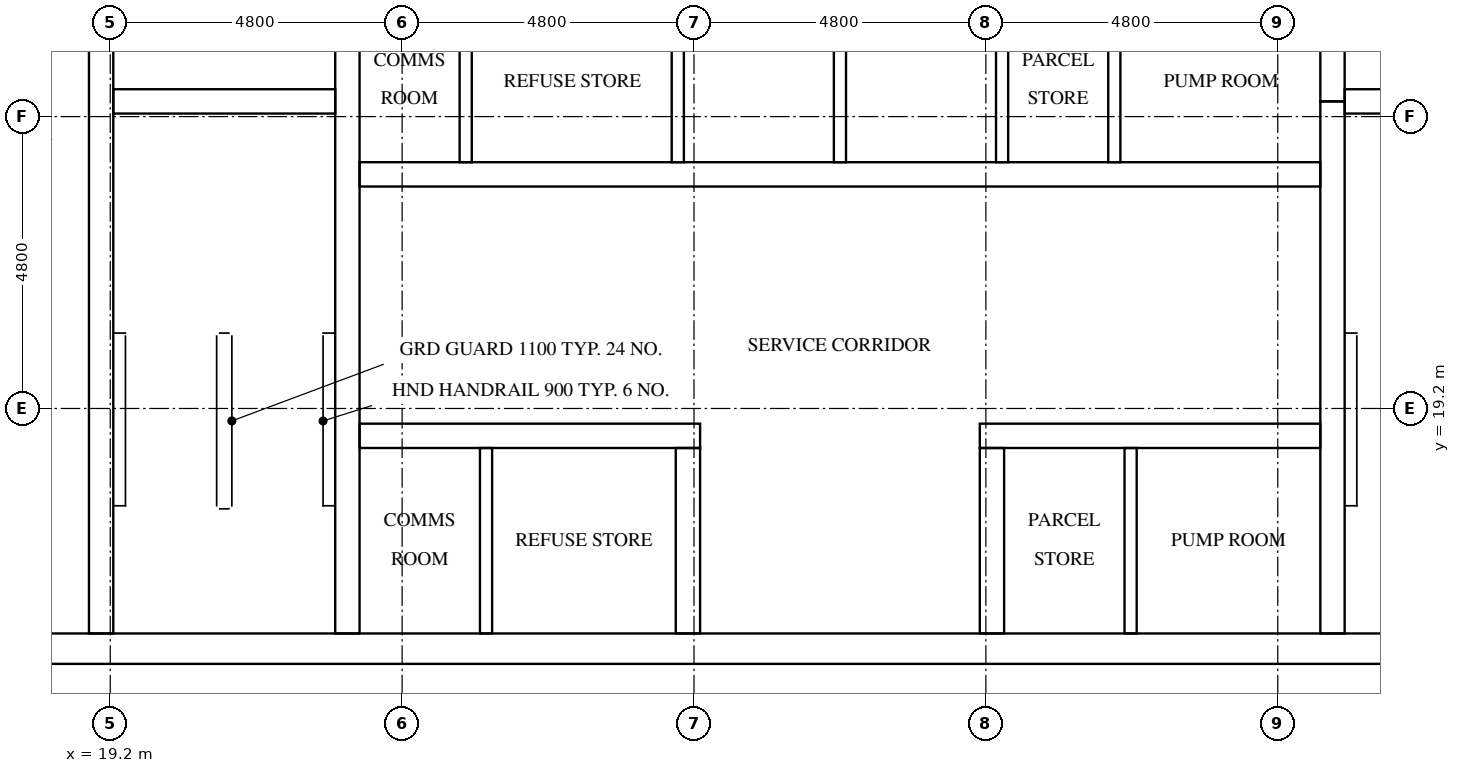
"""IFC4 building model, lengths in metres.
Left out: names, types, materials, properties, quantities, classifications, styles, units other than length and angle.
Written with IfcOpenShell. Run it as: python <this file> out.ifc"""

import sys

from ifc_helpers import new_model, si_unit, direction, frame, frame_2d, origin, place, context, subcontext, project, spatial, rectangle, extrude, element, fill, save


model = new_model("IFC4")
c1 = context("Model", 3, precision=1e-05, world=origin(), true_north=direction((0.0, 1.0)))
c2 = subcontext(c1, "Body", "Model", "MODEL_VIEW")
j1 = project(units=[si_unit("LENGTHUNIT", "METRE"), si_unit("PLANEANGLEUNIT", "RADIAN")], contexts=[c1])
p1 = place(None, origin())
s1 = spatial("IfcSite", under=j1, at=p1, CompositionType="ELEMENT")
p2 = place(p1, origin())
s2 = spatial("IfcBuilding", under=s1, at=p2, CompositionType="ELEMENT")
p3 = place(p2, frame((0.0, 0.0, 268.6)))
s3 = spatial("IfcBuildingStorey", under=s2, at=p3, CompositionType="ELEMENT", Elevation=268.6)
p4 = place(p3, frame((15.0, 15.25, 0.0), z_axis=(0.0, 0.0, 1.0), x_axis=(1.0, 0.0, 0.0)))
e1 = element("IfcWall", 1, at=p4, inside=s3, PredefinedType="SHEAR", context=c2, shape_type="SweptSolid", body=[
    extrude(rectangle(XDim=32.4, YDim=0.5, at=frame_2d((16.2, 0.0))), origin(), (0.0, 0.0, 1.0), 3.2),
])
p5 = place(p4, frame((15.3, 0.0, 0.0)))
e2 = element("IfcOpeningElement", 2, at=p5, cuts=e1, PredefinedType="OPENING", context=c2, shape_type="SweptSolid", body=[
    extrude(rectangle(XDim=1.8, YDim=2.1, at=frame_2d((0.9, 1.05))), frame((0.0, 0.26, 0.0), z_axis=(0.0, -1.0, 0.0), x_axis=(1.0, 0.0, 0.0)), (0.0, 0.0, 1.0), 0.52),
])
p6 = place(p3, frame((19.05, 15.5, 0.0), z_axis=(0.0, 0.0, 1.0), x_axis=(0.0, 1.0, 0.0)))
e3 = element("IfcWall", 3, at=p6, inside=s3, PredefinedType="SHEAR", context=c2, shape_type="SweptSolid", body=[
    extrude(rectangle(XDim=15.55, YDim=0.4, at=frame_2d((7.775, 0.0))), origin(), (0.0, 0.0, 1.0), 3.2),
])
p7 = place(p6, frame((9.95, 0.0, 0.0)))
e4 = element("IfcOpeningElement", 4, at=p7, cuts=e3, PredefinedType="OPENING", context=c2, shape_type="SweptSolid", body=[
    extrude(rectangle(XDim=1.1, YDim=2.1, at=frame_2d((0.55, 1.05))), frame((0.0, 0.21, 0.0), z_axis=(0.0, -1.0, 0.0), x_axis=(1.0, 0.0, 0.0)), (0.0, 0.0, 1.0), 0.42),
])
p8 = place(p6, frame((13.45, 0.0, 0.0)))
e5 = element("IfcOpeningElement", 5, at=p8, cuts=e3, PredefinedType="OPENING", context=c2, shape_type="SweptSolid", body=[
    extrude(rectangle(XDim=1.1, YDim=2.1, at=frame_2d((0.55, 1.05))), frame((0.0, 0.21, 0.0), z_axis=(0.0, -1.0, 0.0), x_axis=(1.0, 0.0, 0.0)), (0.0, 0.0, 1.0), 0.42),
])
p9 = place(p6, frame((0.7, 0.0, 0.0)))
e6 = element("IfcOpeningElement", 6, at=p9, cuts=e3, PredefinedType="OPENING", context=c2, shape_type="SweptSolid", body=[
    extrude(rectangle(XDim=1.2, YDim=2.1, at=frame_2d((0.6, 1.05))), frame((0.0, 0.21, 0.0), z_axis=(0.0, -1.0, 0.0), x_axis=(1.0, 0.0, 0.0)), (0.0, 0.0, 1.0), 0.42),
])
p10 = place(p3, frame((23.1, 15.5, 0.0), z_axis=(0.0, 0.0, 1.0), x_axis=(0.0, 1.0, 0.0)))
e7 = element("IfcWall", 7, at=p10, inside=s3, PredefinedType="SHEAR", context=c2, shape_type="SweptSolid", body=[
    extrude(rectangle(XDim=21.8, YDim=0.4, at=frame_2d((10.9, 0.0))), origin(), (0.0, 0.0, 1.0), 3.2),
])
p11 = place(p3, frame((39.3, 15.5, 0.0), z_axis=(0.0, 0.0, 1.0), x_axis=(0.0, 1.0, 0.0)))
e8 = element("IfcWall", 8, at=p11, inside=s3, PredefinedType="SHEAR", context=c2, shape_type="SweptSolid", body=[
    extrude(rectangle(XDim=8.75, YDim=0.4, at=frame_2d((4.375, 0.0))), origin(), (0.0, 0.0, 1.0), 3.2),
])
p12 = place(p3, frame((39.3, 24.25, 0.0), z_axis=(0.0, 0.0, 1.0), x_axis=(0.0, 1.0, 0.0)))
e9 = element("IfcWall", 9, at=p12, inside=s3, PredefinedType="SHEAR", context=c2, shape_type="SweptSolid", body=[
    extrude(rectangle(XDim=3.5, YDim=0.4, at=frame_2d((1.75, 0.0))), origin(), (0.0, 0.0, 1.0), 3.2),
])
for number, where, z_axis, x_axis in (
    (10, (19.25, 24.25, 0.0), (0.0, 0.0, 1.0), (1.0, 0.0, 0.0)),
    (11, (39.5, 24.25, 0.0), (0.0, 0.0, 1.0), (1.0, 0.0, 0.0)),
):
    element("IfcWall", number, at=place(p3, frame(where, z_axis=z_axis, x_axis=x_axis)), inside=s3, PredefinedType="SHEAR", context=c2, shape_type="SweptSolid", body=[
        extrude(rectangle(XDim=3.65, YDim=0.4, at=frame_2d((1.825, 0.0))), origin(), (0.0, 0.0, 1.0), 3.2),
    ])
p13 = place(p3, frame((23.3, 18.75, 0.0), z_axis=(0.0, 0.0, 1.0), x_axis=(1.0, 0.0, 0.0)))
e12 = element("IfcWall", 12, at=p13, inside=s3, PredefinedType="SHEAR", context=c2, shape_type="SweptSolid", body=[
    extrude(rectangle(XDim=5.6, YDim=0.4, at=frame_2d((2.8, 0.0))), origin(), (0.0, 0.0, 1.0), 3.2),
])
p14 = place(p13, frame((0.49, 0.0, 0.0)))
e13 = element("IfcOpeningElement", 13, at=p14, cuts=e12, PredefinedType="OPENING", context=c2, shape_type="SweptSolid", body=[
    extrude(rectangle(XDim=1.0, YDim=2.1, at=frame_2d((0.5, 1.05))), frame((0.0, 0.21, 0.0), z_axis=(0.0, -1.0, 0.0), x_axis=(1.0, 0.0, 0.0)), (0.0, 0.0, 1.0), 0.42),
])
p15 = place(p13, frame((3.19, 0.0, 0.0)))
e14 = element("IfcOpeningElement", 14, at=p15, cuts=e12, PredefinedType="OPENING", context=c2, shape_type="SweptSolid", body=[
    extrude(rectangle(XDim=1.0, YDim=2.1, at=frame_2d((0.5, 1.05))), frame((0.0, 0.21, 0.0), z_axis=(0.0, -1.0, 0.0), x_axis=(1.0, 0.0, 0.0)), (0.0, 0.0, 1.0), 0.42),
])
p16 = place(p3, frame((33.5, 18.75, 0.0), z_axis=(0.0, 0.0, 1.0), x_axis=(1.0, 0.0, 0.0)))
e15 = element("IfcWall", 15, at=p16, inside=s3, PredefinedType="SHEAR", context=c2, shape_type="SweptSolid", body=[
    extrude(rectangle(XDim=5.6, YDim=0.4, at=frame_2d((2.8, 0.0))), origin(), (0.0, 0.0, 1.0), 3.2),
])
p17 = place(p16, frame((0.89, 0.0, 0.0)))
e16 = element("IfcOpeningElement", 16, at=p17, cuts=e15, PredefinedType="OPENING", context=c2, shape_type="SweptSolid", body=[
    extrude(rectangle(XDim=1.0, YDim=2.1, at=frame_2d((0.5, 1.05))), frame((0.0, 0.21, 0.0), z_axis=(0.0, -1.0, 0.0), x_axis=(1.0, 0.0, 0.0)), (0.0, 0.0, 1.0), 0.42),
])
p18 = place(p16, frame((3.59, 0.0, 0.0)))
e17 = element("IfcOpeningElement", 17, at=p18, cuts=e15, PredefinedType="OPENING", context=c2, shape_type="SweptSolid", body=[
    extrude(rectangle(XDim=1.0, YDim=2.1, at=frame_2d((0.5, 1.05))), frame((0.0, 0.21, 0.0), z_axis=(0.0, -1.0, 0.0), x_axis=(1.0, 0.0, 0.0)), (0.0, 0.0, 1.0), 0.42),
])
p19 = place(p3, frame((23.3, 23.05, 0.0), z_axis=(0.0, 0.0, 1.0), x_axis=(1.0, 0.0, 0.0)))
e18 = element("IfcWall", 18, at=p19, inside=s3, PredefinedType="SHEAR", context=c2, shape_type="SweptSolid", body=[
    extrude(rectangle(XDim=15.8, YDim=0.4, at=frame_2d((7.9, 0.0))), origin(), (0.0, 0.0, 1.0), 3.2),
])
p20 = place(p19, frame((0.323, 0.0, 0.0)))
e19 = element("IfcOpeningElement", 19, at=p20, cuts=e18, PredefinedType="OPENING", context=c2, shape_type="SweptSolid", body=[
    extrude(rectangle(XDim=1.0, YDim=2.1, at=frame_2d((0.5, 1.05))), frame((0.0, 0.21, 0.0), z_axis=(0.0, -1.0, 0.0), x_axis=(1.0, 0.0, 0.0)), (0.0, 0.0, 1.0), 0.42),
])
p21 = place(p19, frame((2.989, 0.0, 0.0)))
e20 = element("IfcOpeningElement", 20, at=p21, cuts=e18, PredefinedType="OPENING", context=c2, shape_type="SweptSolid", body=[
    extrude(rectangle(XDim=1.0, YDim=2.1, at=frame_2d((0.5, 1.05))), frame((0.0, 0.21, 0.0), z_axis=(0.0, -1.0, 0.0), x_axis=(1.0, 0.0, 0.0)), (0.0, 0.0, 1.0), 0.42),
])
p22 = place(p19, frame((10.989, 0.0, 0.0)))
e21 = element("IfcOpeningElement", 21, at=p22, cuts=e18, PredefinedType="OPENING", context=c2, shape_type="SweptSolid", body=[
    extrude(rectangle(XDim=1.0, YDim=2.1, at=frame_2d((0.5, 1.05))), frame((0.0, 0.21, 0.0), z_axis=(0.0, -1.0, 0.0), x_axis=(1.0, 0.0, 0.0)), (0.0, 0.0, 1.0), 0.42),
])
p23 = place(p19, frame((13.656, 0.0, 0.0)))
e22 = element("IfcOpeningElement", 22, at=p23, cuts=e18, PredefinedType="OPENING", context=c2, shape_type="SweptSolid", body=[
    extrude(rectangle(XDim=1.0, YDim=2.1, at=frame_2d((0.5, 1.05))), frame((0.0, 0.21, 0.0), z_axis=(0.0, -1.0, 0.0), x_axis=(1.0, 0.0, 0.0)), (0.0, 0.0, 1.0), 0.42),
])
for number, where, z_axis, x_axis in (
    (23, (28.7, 15.5, 0.0), (0.0, 0.0, 1.0), (0.0, 1.0, 0.0)),
    (24, (33.7, 15.5, 0.0), (0.0, 0.0, 1.0), (0.0, 1.0, 0.0)),
):
    element("IfcWall", number, at=place(p3, frame(where, z_axis=z_axis, x_axis=x_axis)), inside=s3, PredefinedType="SHEAR", context=c2, shape_type="SweptSolid", body=[
        extrude(rectangle(XDim=3.05, YDim=0.4, at=frame_2d((1.525, 0.0))), origin(), (0.0, 0.0, 1.0), 3.2),
    ])
for number, where, z_axis, x_axis in (
    (25, (28.533, 23.25, 0.0), (0.0, 0.0, 1.0), (0.0, 1.0, 0.0)),
    (26, (31.2, 23.25, 0.0), (0.0, 0.0, 1.0), (0.0, 1.0, 0.0)),
    (27, (33.867, 23.25, 0.0), (0.0, 0.0, 1.0), (0.0, 1.0, 0.0)),
):
    element("IfcWall", number, at=place(p3, frame(where, z_axis=z_axis, x_axis=x_axis)), inside=s3, PredefinedType="SOLIDWALL", context=c2, shape_type="SweptSolid", body=[
        extrude(rectangle(XDim=2.7, YDim=0.2, at=frame_2d((1.35, 0.0))), origin(), (0.0, 0.0, 1.0), 3.2),
    ])
for number, where, z_axis, x_axis in (
    (28, (25.045, 23.25, 0.0), (0.0, 0.0, 1.0), (0.0, 1.0, 0.0)),
    (29, (35.712, 23.25, 0.0), (0.0, 0.0, 1.0), (0.0, 1.0, 0.0)),
):
    element("IfcWall", number, at=place(p3, frame(where, z_axis=z_axis, x_axis=x_axis)), inside=s3, PredefinedType="PARTITIONING", context=c2, shape_type="SweptSolid", body=[
        extrude(rectangle(XDim=2.7, YDim=0.2, at=frame_2d((1.35, 0.0))), origin(), (0.0, 0.0, 1.0), 3.2),
    ])
for number, where, z_axis, x_axis in (
    (30, (25.38, 15.5, 0.0), (0.0, 0.0, 1.0), (0.0, 1.0, 0.0)),
    (31, (35.98, 15.5, 0.0), (0.0, 0.0, 1.0), (0.0, 1.0, 0.0)),
):
    element("IfcWall", number, at=place(p3, frame(where, z_axis=z_axis, x_axis=x_axis)), inside=s3, PredefinedType="PARTITIONING", context=c2, shape_type="SweptSolid", body=[
        extrude(rectangle(XDim=3.05, YDim=0.2, at=frame_2d((1.525, 0.0))), origin(), (0.0, 0.0, 1.0), 3.2),
    ])
p24 = place(p9, frame((1.2, 0.0, 0.0), z_axis=(0.0, 0.0, 1.0), x_axis=(-1.0, 0.0, 0.0)))
e32 = element("IfcDoor", 32, at=p24, inside=s3, OperationType="SINGLE_SWING_RIGHT", PredefinedType="DOOR", context=c2, shape_type="SweptSolid", body=[
    extrude(rectangle(XDim=1.2, YDim=2.1, at=frame_2d((0.6, 1.05))), frame((0.0, 0.025, 0.0), z_axis=(0.0, -1.0, 0.0), x_axis=(1.0, 0.0, 0.0)), (0.0, 0.0, 1.0), 0.05),
])
fill(e6, e32)
p25 = place(p5, frame((1.8, 0.0, 0.0), z_axis=(0.0, 0.0, 1.0), x_axis=(-1.0, 0.0, 0.0)))
e33 = element("IfcDoor", 33, at=p25, inside=s3, OperationType="DOUBLE_DOOR_SINGLE_SWING", PredefinedType="DOOR", context=c2, shape_type="SweptSolid", body=[
    extrude(rectangle(XDim=1.8, YDim=2.1, at=frame_2d((0.9, 1.05))), frame((0.0, 0.025, 0.0), z_axis=(0.0, -1.0, 0.0), x_axis=(1.0, 0.0, 0.0)), (0.0, 0.0, 1.0), 0.05),
])
fill(e2, e33)
p26 = place(p20, frame((1.0, 0.0, 0.0), z_axis=(0.0, 0.0, 1.0), x_axis=(-1.0, 0.0, 0.0)))
e34 = element("IfcDoor", 34, at=p26, inside=s3, OperationType="SINGLE_SWING_LEFT", PredefinedType="DOOR", context=c2, shape_type="SweptSolid", body=[
    extrude(rectangle(XDim=1.0, YDim=2.1, at=frame_2d((0.5, 1.05))), frame((0.0, 0.025, 0.0), z_axis=(0.0, -1.0, 0.0), x_axis=(1.0, 0.0, 0.0)), (0.0, 0.0, 1.0), 0.05),
])
fill(e19, e34)
p27 = place(p21, frame((1.0, 0.0, 0.0), z_axis=(0.0, 0.0, 1.0), x_axis=(-1.0, 0.0, 0.0)))
e35 = element("IfcDoor", 35, at=p27, inside=s3, OperationType="SINGLE_SWING_RIGHT", PredefinedType="DOOR", context=c2, shape_type="SweptSolid", body=[
    extrude(rectangle(XDim=1.0, YDim=2.1, at=frame_2d((0.5, 1.05))), frame((0.0, 0.025, 0.0), z_axis=(0.0, -1.0, 0.0), x_axis=(1.0, 0.0, 0.0)), (0.0, 0.0, 1.0), 0.05),
])
fill(e20, e35)
p28 = place(p22, frame((1.0, 0.0, 0.0), z_axis=(0.0, 0.0, 1.0), x_axis=(-1.0, 0.0, 0.0)))
e36 = element("IfcDoor", 36, at=p28, inside=s3, OperationType="SINGLE_SWING_LEFT", PredefinedType="DOOR", context=c2, shape_type="SweptSolid", body=[
    extrude(rectangle(XDim=1.0, YDim=2.1, at=frame_2d((0.5, 1.05))), frame((0.0, 0.025, 0.0), z_axis=(0.0, -1.0, 0.0), x_axis=(1.0, 0.0, 0.0)), (0.0, 0.0, 1.0), 0.05),
])
fill(e21, e36)
p29 = place(p23, frame((1.0, 0.0, 0.0), z_axis=(0.0, 0.0, 1.0), x_axis=(-1.0, 0.0, 0.0)))
e37 = element("IfcDoor", 37, at=p29, inside=s3, OperationType="SINGLE_SWING_RIGHT", PredefinedType="DOOR", context=c2, shape_type="SweptSolid", body=[
    extrude(rectangle(XDim=1.0, YDim=2.1, at=frame_2d((0.5, 1.05))), frame((0.0, 0.025, 0.0), z_axis=(0.0, -1.0, 0.0), x_axis=(1.0, 0.0, 0.0)), (0.0, 0.0, 1.0), 0.05),
])
fill(e22, e37)
p30 = place(p14, origin())
e38 = element("IfcDoor", 38, at=p30, inside=s3, OperationType="SINGLE_SWING_LEFT", PredefinedType="DOOR", context=c2, shape_type="SweptSolid", body=[
    extrude(rectangle(XDim=1.0, YDim=2.1, at=frame_2d((0.5, 1.05))), frame((0.0, 0.025, 0.0), z_axis=(0.0, -1.0, 0.0), x_axis=(1.0, 0.0, 0.0)), (0.0, 0.0, 1.0), 0.05),
])
fill(e13, e38)
p31 = place(p15, origin())
e39 = element("IfcDoor", 39, at=p31, inside=s3, OperationType="SINGLE_SWING_RIGHT", PredefinedType="DOOR", context=c2, shape_type="SweptSolid", body=[
    extrude(rectangle(XDim=1.0, YDim=2.1, at=frame_2d((0.5, 1.05))), frame((0.0, 0.025, 0.0), z_axis=(0.0, -1.0, 0.0), x_axis=(1.0, 0.0, 0.0)), (0.0, 0.0, 1.0), 0.05),
])
fill(e14, e39)
p32 = place(p17, origin())
e40 = element("IfcDoor", 40, at=p32, inside=s3, OperationType="SINGLE_SWING_LEFT", PredefinedType="DOOR", context=c2, shape_type="SweptSolid", body=[
    extrude(rectangle(XDim=1.0, YDim=2.1, at=frame_2d((0.5, 1.05))), frame((0.0, 0.025, 0.0), z_axis=(0.0, -1.0, 0.0), x_axis=(1.0, 0.0, 0.0)), (0.0, 0.0, 1.0), 0.05),
])
fill(e16, e40)
p33 = place(p18, origin())
e41 = element("IfcDoor", 41, at=p33, inside=s3, OperationType="SINGLE_SWING_RIGHT", PredefinedType="DOOR", context=c2, shape_type="SweptSolid", body=[
    extrude(rectangle(XDim=1.0, YDim=2.1, at=frame_2d((0.5, 1.05))), frame((0.0, 0.025, 0.0), z_axis=(0.0, -1.0, 0.0), x_axis=(1.0, 0.0, 0.0)), (0.0, 0.0, 1.0), 0.05),
])
fill(e17, e41)
save(model, sys.argv[1])
